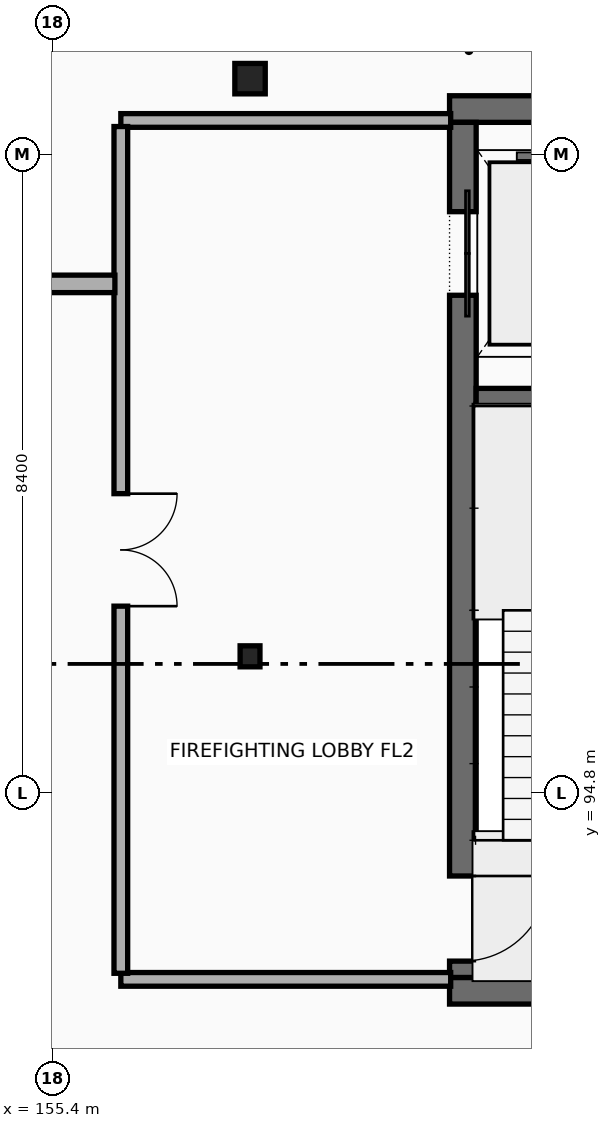
"""IFC4 building model, lengths in metres.
Left out: names, types, materials, properties, quantities, classifications, styles, units other than length and angle.
Written with IfcOpenShell. Run it as: python <this file> out.ifc"""

import sys

from ifc_helpers import new_model, si_unit, direction, frame, frame_2d, origin, origin_2d, place, context, subcontext, project, spatial, rectangle, i_section, extrude, element, fill, save


model = new_model("IFC4")
c1 = context("Model", 3, precision=1e-05, world=origin(), true_north=direction((0.0, 1.0)))
c2 = subcontext(c1, "Body", "Model", "MODEL_VIEW")
j1 = project(units=[si_unit("LENGTHUNIT", "METRE"), si_unit("PLANEANGLEUNIT", "RADIAN")], contexts=[c1])
p1 = place(None, origin())
s1 = spatial("IfcSite", under=j1, at=p1, CompositionType="ELEMENT")
p2 = place(p1, origin())
s2 = spatial("IfcBuilding", under=s1, at=p2, CompositionType="ELEMENT")
p3 = place(p2, frame((0.0, 0.0, 4.8)))
s3 = spatial("IfcBuildingStorey", under=s2, at=p3, CompositionType="ELEMENT", Elevation=4.8)
for number, where, z_axis, x_axis in (
    (1, (160.625, 92.2, 0.0), (0.0, 0.0, 1.0), (1.0, 0.0, 0.0)),
    (2, (165.375, 103.8, 0.0), (0.0, 0.0, 1.0), (-1.0, 0.0, 0.0)),
):
    element("IfcWall", number, at=place(p3, frame(where, z_axis=z_axis, x_axis=x_axis)), inside=s3, PredefinedType="SHEAR", context=c2, shape_type="SweptSolid", body=[
        extrude(rectangle(XDim=4.75, YDim=0.35, at=frame_2d((2.375, 0.0))), origin(), (0.0, 0.0, 1.0), 3.9),
    ])
p4 = place(p3, frame((160.8, 103.625, 0.0), z_axis=(0.0, 0.0, 1.0), x_axis=(0.0, -1.0, 0.0)))
e3 = element("IfcWall", 3, at=p4, inside=s3, PredefinedType="SHEAR", context=c2, shape_type="SweptSolid", body=[
    extrude(rectangle(XDim=11.25, YDim=0.35, at=frame_2d((5.625, 0.0))), origin(), (0.0, 0.0, 1.0), 3.9),
])
p5 = place(p4, frame((1.175, 0.0, 0.0)))
e4 = element("IfcOpeningElement", 4, at=p5, cuts=e3, PredefinedType="OPENING", context=c2, shape_type="SweptSolid", body=[
    extrude(rectangle(XDim=1.1, YDim=2.2, at=frame_2d((0.55, 1.1))), frame((0.0, 0.185, 0.0), z_axis=(0.0, -1.0, 0.0), x_axis=(1.0, 0.0, 0.0)), (0.0, 0.0, 1.0), 0.37),
])
p6 = place(p4, frame((9.915, 0.0, 0.0)))
e5 = element("IfcOpeningElement", 5, at=p6, cuts=e3, PredefinedType="OPENING", context=c2, shape_type="SweptSolid", body=[
    extrude(rectangle(XDim=1.12, YDim=2.16, at=frame_2d((0.56, 1.08))), frame((0.0, 0.185, 0.0), z_axis=(0.0, -1.0, 0.0), x_axis=(1.0, 0.0, 0.0)), (0.0, 0.0, 1.0), 0.37),
])
p7 = place(p3, frame((160.975, 100.0, 0.0), z_axis=(0.0, 0.0, 1.0), x_axis=(1.0, 0.0, 0.0)))
e6 = element("IfcWall", 6, at=p7, inside=s3, PredefinedType="SHEAR", context=c2, shape_type="SweptSolid", body=[
    extrude(rectangle(XDim=4.05, YDim=0.25, at=frame_2d((2.025, 0.0))), origin(), (0.0, 0.0, 1.0), 3.9),
])
p8 = place(p3, frame((158.0, 96.6, 0.0), z_axis=(0.0, 0.0, 1.0), x_axis=(1.0, 0.0, 0.0)))
e7 = element("IfcColumn", 7, at=p8, inside=s3, PredefinedType="COLUMN", context=c2, shape_type="SweptSolid", body=[
    extrude(i_section(OverallWidth=0.261, OverallDepth=0.276, WebThickness=0.015, FlangeThickness=0.025, at=origin_2d()), origin(), (0.0, 0.0, 1.0), 3.9),
])
p9 = place(p3, frame((158.0, 104.2, 0.0), z_axis=(0.0, 0.0, 1.0), x_axis=(1.0, 0.0, 0.0)))
e8 = element("IfcColumn", 8, at=p9, inside=s3, PredefinedType="COLUMN", context=c2, shape_type="SweptSolid", body=[
    extrude(rectangle(XDim=0.4, YDim=0.4, at=origin_2d()), origin(), (0.0, 0.0, 1.0), 3.9),
])
p10 = place(p3, frame((156.3, 92.35, 0.0), z_axis=(0.0, 0.0, 1.0), x_axis=(1.0, 0.0, 0.0)))
e9 = element("IfcWall", 9, at=p10, inside=s3, PredefinedType="PARTITIONING", context=c2, shape_type="SweptSolid", body=[
    extrude(rectangle(XDim=4.34, YDim=0.18, at=frame_2d((2.17, 0.0))), origin(), (0.0, 0.0, 1.0), 2.913),
])
p11 = place(p3, frame((160.64, 103.65, 0.0), z_axis=(0.0, 0.0, 1.0), x_axis=(-1.0, 0.0, 0.0)))
e10 = element("IfcWall", 10, at=p11, inside=s3, PredefinedType="PARTITIONING", context=c2, shape_type="SweptSolid", body=[
    extrude(rectangle(XDim=4.34, YDim=0.18, at=frame_2d((2.17, 0.0))), origin(), (0.0, 0.0, 1.0), 2.838),
])
p12 = place(p3, frame((156.3, 103.57, 0.0), z_axis=(0.0, 0.0, 1.0), x_axis=(0.0, -1.0, 0.0)))
e11 = element("IfcWall", 11, at=p12, inside=s3, PredefinedType="PARTITIONING", context=c2, shape_type="SweptSolid", body=[
    extrude(rectangle(XDim=11.14, YDim=0.18, at=frame_2d((5.57, 0.0))), origin(), (0.0, 0.0, 1.0), 3.14),
])
p13 = place(p12, frame((4.83, 0.0, 0.0)))
e12 = element("IfcOpeningElement", 12, at=p13, cuts=e11, PredefinedType="OPENING", context=c2, shape_type="SweptSolid", body=[
    extrude(rectangle(XDim=1.48, YDim=2.22, at=frame_2d((0.74, 1.11))), frame((0.0, 0.1, 0.0), z_axis=(0.0, -1.0, 0.0), x_axis=(1.0, 0.0, 0.0)), (0.0, 0.0, 1.0), 0.2),
])
p14 = place(p3, frame((134.332, 101.5, 0.0), z_axis=(0.0, 0.0, 1.0), x_axis=(1.0, 0.0, 0.0)))
e13 = element("IfcWall", 13, at=p14, inside=s3, PredefinedType="PARTITIONING", context=c2, shape_type="SweptSolid", body=[
    extrude(rectangle(XDim=21.89, YDim=0.23, at=frame_2d((10.945, 0.0))), origin(), (0.0, 0.0, 1.0), 2.913),
])
p15 = place(p5, origin())
e14 = element("IfcDoor", 14, at=p15, inside=s3, OperationType="DOUBLE_DOOR_SLIDING", PredefinedType="DOOR", context=c2, shape_type="SweptSolid", body=[
    extrude(rectangle(XDim=1.1, YDim=2.2, at=frame_2d((0.55, 1.1))), frame((0.0, 0.025, 0.0), z_axis=(0.0, -1.0, 0.0), x_axis=(1.0, 0.0, 0.0)), (0.0, 0.0, 1.0), 0.05),
])
fill(e4, e14)
p16 = place(p6, origin())
e15 = element("IfcDoor", 15, at=p16, inside=s3, OperationType="SINGLE_SWING_LEFT", PredefinedType="DOOR", context=c2, shape_type="SweptSolid", body=[
    extrude(rectangle(XDim=1.12, YDim=2.16, at=frame_2d((0.56, 1.08))), frame((0.0, 0.025, 0.0), z_axis=(0.0, -1.0, 0.0), x_axis=(1.0, 0.0, 0.0)), (0.0, 0.0, 1.0), 0.05),
])
fill(e5, e15)
p17 = place(p13, origin())
e16 = element("IfcDoor", 16, at=p17, inside=s3, OperationType="DOUBLE_DOOR_SINGLE_SWING", PredefinedType="DOOR", context=c2, shape_type="SweptSolid", body=[
    extrude(rectangle(XDim=1.48, YDim=2.22, at=frame_2d((0.74, 1.11))), frame((0.0, 0.025, 0.0), z_axis=(0.0, -1.0, 0.0), x_axis=(1.0, 0.0, 0.0)), (0.0, 0.0, 1.0), 0.05),
])
fill(e12, e16)
save(model, sys.argv[1])
